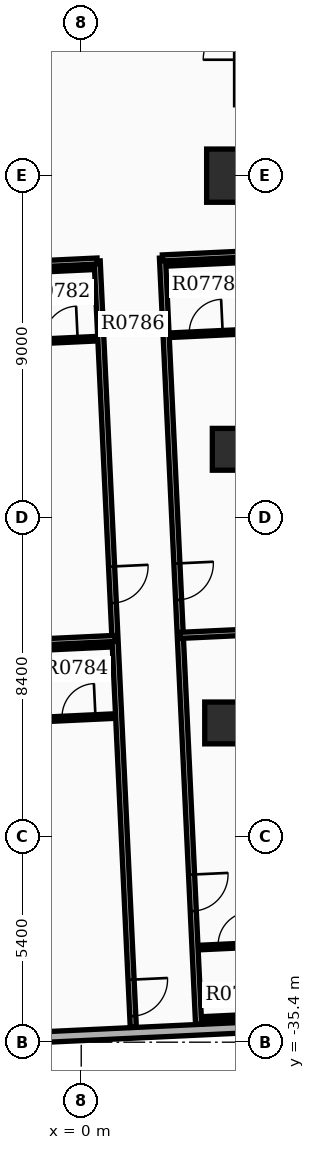
"""IFC4 building model, lengths in metres.
Left out: names, types, materials, properties, quantities, classifications, styles, units other than length and angle.
Written with IfcOpenShell. Run it as: python <this file> out.ifc"""

import sys

from ifc_helpers import new_model, si_unit, direction, frame, frame_2d, origin, origin_2d, place, context, subcontext, project, spatial, rectangle, extrude, element, fill, save


model = new_model("IFC4")
c1 = context("Model", 3, precision=1e-05, world=origin(), true_north=direction((0.0, 1.0)))
c2 = subcontext(c1, "Body", "Model", "MODEL_VIEW")
j1 = project(units=[si_unit("LENGTHUNIT", "METRE"), si_unit("PLANEANGLEUNIT", "RADIAN")], contexts=[c1])
p1 = place(None, origin())
s1 = spatial("IfcSite", under=j1, at=p1, CompositionType="ELEMENT")
p2 = place(p1, origin())
s2 = spatial("IfcBuilding", under=s1, at=p2, CompositionType="ELEMENT")
p3 = place(p2, frame((0.0, 0.0, 52.2)))
s3 = spatial("IfcBuildingStorey", under=s2, at=p3, CompositionType="ELEMENT", Elevation=52.2)
p4 = place(p3, frame((4.0, -12.6, 0.0), z_axis=(0.0, 0.0, 1.0), x_axis=(1.0, 0.0, 0.0)))
e1 = element("IfcColumn", 1, at=p4, inside=s3, PredefinedType="COLUMN", context=c2, shape_type="SweptSolid", body=[
    extrude(rectangle(XDim=1.4, YDim=1.4, at=origin_2d()), origin(), (0.0, 0.0, 1.0), 3.9),
])
for number, where, z_axis, x_axis in (
    (2, (4.0, -19.8, 0.0), (0.0, 0.0, 1.0), (1.0, 0.0, 0.0)),
    (3, (3.8, -27.0, 0.0), (0.0, 0.0, 1.0), (1.0, 0.0, 0.0)),
):
    element("IfcColumn", number, at=place(p3, frame(where, z_axis=z_axis, x_axis=x_axis)), inside=s3, PredefinedType="COLUMN", context=c2, shape_type="SweptSolid", body=[
        extrude(rectangle(XDim=1.1, YDim=1.1, at=origin_2d()), origin(), (0.0, 0.0, 1.0), 3.9),
    ])
p5 = place(p3, frame((-5.195, -35.464, 0.0), z_axis=(0.0, 0.0, 1.0), x_axis=(0.998890092147, 0.047101845086, 0.0)))
e4 = element("IfcWall", 4, at=p5, inside=s3, PredefinedType="STANDARD", context=c2, shape_type="SweptSolid", body=[
    extrude(rectangle(XDim=13.72, YDim=0.28, at=frame_2d((6.86, 0.0))), origin(), (0.0, 0.0, 1.0), 2.91),
])
p6 = place(p5, frame((0.85, 0.0, 0.85)))
e5 = element("IfcOpeningElement", 5, at=p6, cuts=e4, PredefinedType="OPENING", context=c2, shape_type="SweptSolid", body=[
    extrude(rectangle(XDim=1.0, YDim=1.5, at=frame_2d((0.5, 0.75))), frame((0.0, 0.15, 0.0), z_axis=(0.0, -1.0, 0.0), x_axis=(1.0, 0.0, 0.0)), (0.0, 0.0, 1.0), 0.3),
])
p7 = place(p3, frame((2.138, -14.766, 0.0), z_axis=(0.0, 0.0, 1.0), x_axis=(0.047105352469, -0.998889926753, 0.0)))
e6 = element("IfcWall", 6, at=p7, inside=s3, PredefinedType="PARTITIONING", context=c2, shape_type="SweptSolid", body=[
    extrude(rectangle(XDim=20.182, YDim=0.16, at=frame_2d((10.091, 0.0))), origin(), (0.0, 0.0, 1.0), 2.9),
])
p8 = place(p7, frame((8.047, 0.0, 0.0)))
e7 = element("IfcOpeningElement", 7, at=p8, cuts=e6, PredefinedType="OPENING", context=c2, shape_type="SweptSolid", body=[
    extrude(rectangle(XDim=0.96, YDim=2.15, at=frame_2d((0.48, 1.075))), frame((0.0, 0.09, 0.0), z_axis=(0.0, -1.0, 0.0), x_axis=(1.0, 0.0, 0.0)), (0.0, 0.0, 1.0), 0.18),
])
p9 = place(p7, frame((16.243, 0.0, 0.0)))
e8 = element("IfcOpeningElement", 8, at=p9, cuts=e6, PredefinedType="OPENING", context=c2, shape_type="SweptSolid", body=[
    extrude(rectangle(XDim=0.96, YDim=2.15, at=frame_2d((0.48, 1.075))), frame((0.0, 0.09, 0.0), z_axis=(0.0, -1.0, 0.0), x_axis=(1.0, 0.0, 0.0)), (0.0, 0.0, 1.0), 0.18),
])
p10 = place(p3, frame((2.138, -14.766, 0.0), z_axis=(0.0, 0.0, 1.0), x_axis=(0.998891553151, 0.047070851322, 0.0)))
e9 = element("IfcWall", 9, at=p10, inside=s3, PredefinedType="PARTITIONING", context=c2, shape_type="SweptSolid", body=[
    extrude(rectangle(XDim=5.28, YDim=0.16, at=frame_2d((2.64, 0.0))), origin(), (0.0, 0.0, 1.0), 2.9),
])
p11 = place(p3, frame((2.606, -24.696, 0.0), z_axis=(0.0, 0.0, 1.0), x_axis=(0.998890307811, 0.047097271264, 0.0)))
e10 = element("IfcWall", 10, at=p11, inside=s3, PredefinedType="PARTITIONING", context=c2, shape_type="SweptSolid", body=[
    extrude(rectangle(XDim=5.132, YDim=0.16, at=frame_2d((2.566, 0.0))), origin(), (0.0, 0.0, 1.0), 2.9),
])
p12 = place(p3, frame((2.374, -16.797, 0.0), z_axis=(0.0, 0.0, 1.0), x_axis=(0.998891083954, 0.047080807099, 0.0)))
e11 = element("IfcWall", 11, at=p12, inside=s3, PredefinedType="PARTITIONING", context=c2, shape_type="SweptSolid", body=[
    extrude(rectangle(XDim=1.82, YDim=0.12, at=frame_2d((0.91, 0.0))), origin(), (0.0, 0.0, 1.0), 2.9),
])
p13 = place(p12, frame((0.47, 0.0, 0.0)))
e12 = element("IfcOpeningElement", 12, at=p13, cuts=e11, PredefinedType="OPENING", context=c2, shape_type="SweptSolid", body=[
    extrude(rectangle(XDim=0.88, YDim=2.1, at=frame_2d((0.44, 1.05))), frame((0.0, 0.07, 0.0), z_axis=(0.0, -1.0, 0.0), x_axis=(1.0, 0.0, 0.0)), (0.0, 0.0, 1.0), 0.14),
])
p14 = place(p3, frame((2.285, -14.919, 0.0), z_axis=(0.0, 0.0, 1.0), x_axis=(0.998890786574, 0.047087116047, 0.0)))
e13 = element("IfcWall", 13, at=p14, inside=s3, PredefinedType="PARTITIONING", context=c2, shape_type="SweptSolid", body=[
    extrude(rectangle(XDim=1.82, YDim=0.12, at=frame_2d((0.91, 0.0))), origin(), (0.0, 0.0, 1.0), 2.9),
])
p15 = place(p3, frame((3.134, -32.909, 0.0), z_axis=(0.0, 0.0, 1.0), x_axis=(0.998890786574, 0.047087116047, 0.0)))
e14 = element("IfcWall", 14, at=p15, inside=s3, PredefinedType="PARTITIONING", context=c2, shape_type="SweptSolid", body=[
    extrude(rectangle(XDim=1.82, YDim=0.12, at=frame_2d((0.91, 0.0))), origin(), (0.0, 0.0, 1.0), 2.9),
])
p16 = place(p15, frame((0.47, 0.0, 0.0)))
e15 = element("IfcOpeningElement", 15, at=p16, cuts=e14, PredefinedType="OPENING", context=c2, shape_type="SweptSolid", body=[
    extrude(rectangle(XDim=0.88, YDim=2.1, at=frame_2d((0.44, 1.05))), frame((0.0, 0.07, 0.0), z_axis=(0.0, -1.0, 0.0), x_axis=(1.0, 0.0, 0.0)), (0.0, 0.0, 1.0), 0.14),
])
p17 = place(p3, frame((3.222, -34.787, 0.0), z_axis=(0.0, 0.0, 1.0), x_axis=(0.998890786574, 0.047087116047, 0.0)))
e16 = element("IfcWall", 16, at=p17, inside=s3, PredefinedType="PARTITIONING", context=c2, shape_type="SweptSolid", body=[
    extrude(rectangle(XDim=1.82, YDim=0.12, at=frame_2d((0.91, 0.0))), origin(), (0.0, 0.0, 1.0), 2.9),
])
p18 = place(p3, frame((0.42, -14.847, 0.0), z_axis=(0.0, 0.0, 1.0), x_axis=(0.047105352469, -0.998889926753, 0.0)))
e17 = element("IfcWall", 17, at=p18, inside=s3, PredefinedType="PARTITIONING", context=c2, shape_type="SweptSolid", body=[
    extrude(rectangle(XDim=20.182, YDim=0.16, at=frame_2d((10.091, 0.0))), origin(), (0.0, 0.0, 1.0), 2.9),
])
p19 = place(p18, frame((8.047, 0.0, 0.0)))
e18 = element("IfcOpeningElement", 18, at=p19, cuts=e17, PredefinedType="OPENING", context=c2, shape_type="SweptSolid", body=[
    extrude(rectangle(XDim=0.96, YDim=2.15, at=frame_2d((0.48, 1.075))), frame((0.0, 0.09, 0.0), z_axis=(0.0, -1.0, 0.0), x_axis=(1.0, 0.0, 0.0)), (0.0, 0.0, 1.0), 0.18),
])
p20 = place(p18, frame((18.93, 0.0, 0.0)))
e19 = element("IfcOpeningElement", 19, at=p20, cuts=e17, PredefinedType="OPENING", context=c2, shape_type="SweptSolid", body=[
    extrude(rectangle(XDim=0.96, YDim=2.15, at=frame_2d((0.48, 1.075))), frame((0.0, 0.09, 0.0), z_axis=(0.0, -1.0, 0.0), x_axis=(1.0, 0.0, 0.0)), (0.0, 0.0, 1.0), 0.18),
])
p21 = place(p3, frame((0.42, -14.847, 0.0), z_axis=(0.0, 0.0, 1.0), x_axis=(-0.998889138652, -0.047122061533, 0.0)))
e20 = element("IfcWall", 20, at=p21, inside=s3, PredefinedType="PARTITIONING", context=c2, shape_type="SweptSolid", body=[
    extrude(rectangle(XDim=6.44, YDim=0.16, at=frame_2d((3.22, 0.0))), origin(), (0.0, 0.0, 1.0), 2.9),
])
p22 = place(p3, frame((0.888, -24.777, 0.0), z_axis=(0.0, 0.0, 1.0), x_axis=(-0.998889977605, -0.047104274115, 0.0)))
e21 = element("IfcWall", 21, at=p22, inside=s3, PredefinedType="PARTITIONING", context=c2, shape_type="SweptSolid", body=[
    extrude(rectangle(XDim=6.292, YDim=0.16, at=frame_2d((3.146, 0.0))), origin(), (0.0, 0.0, 1.0), 2.9),
])
p23 = place(p3, frame((-1.442, -16.977, 0.0), z_axis=(0.0, 0.0, 1.0), x_axis=(0.998891083954, 0.047080807099, 0.0)))
e22 = element("IfcWall", 22, at=p23, inside=s3, PredefinedType="PARTITIONING", context=c2, shape_type="SweptSolid", body=[
    extrude(rectangle(XDim=1.82, YDim=0.12, at=frame_2d((0.91, 0.0))), origin(), (0.0, 0.0, 1.0), 2.9),
])
p24 = place(p23, frame((0.47, 0.0, 0.0)))
e23 = element("IfcOpeningElement", 23, at=p24, cuts=e22, PredefinedType="OPENING", context=c2, shape_type="SweptSolid", body=[
    extrude(rectangle(XDim=0.88, YDim=2.1, at=frame_2d((0.44, 1.05))), frame((0.0, 0.07, 0.0), z_axis=(0.0, -1.0, 0.0), x_axis=(1.0, 0.0, 0.0)), (0.0, 0.0, 1.0), 0.14),
])
p25 = place(p3, frame((-1.531, -15.099, 0.0), z_axis=(0.0, 0.0, 1.0), x_axis=(0.998891083954, 0.047080807099, 0.0)))
e24 = element("IfcWall", 24, at=p25, inside=s3, PredefinedType="PARTITIONING", context=c2, shape_type="SweptSolid", body=[
    extrude(rectangle(XDim=1.82, YDim=0.12, at=frame_2d((0.91, 0.0))), origin(), (0.0, 0.0, 1.0), 2.9),
])
p26 = place(p3, frame((-0.974, -26.907, 0.0), z_axis=(0.0, 0.0, 1.0), x_axis=(0.998891083954, 0.047080807099, 0.0)))
e25 = element("IfcWall", 25, at=p26, inside=s3, PredefinedType="PARTITIONING", context=c2, shape_type="SweptSolid", body=[
    extrude(rectangle(XDim=1.82, YDim=0.12, at=frame_2d((0.91, 0.0))), origin(), (0.0, 0.0, 1.0), 2.9),
])
p27 = place(p26, frame((0.47, 0.0, 0.0)))
e26 = element("IfcOpeningElement", 26, at=p27, cuts=e25, PredefinedType="OPENING", context=c2, shape_type="SweptSolid", body=[
    extrude(rectangle(XDim=0.88, YDim=2.1, at=frame_2d((0.44, 1.05))), frame((0.0, 0.07, 0.0), z_axis=(0.0, -1.0, 0.0), x_axis=(1.0, 0.0, 0.0)), (0.0, 0.0, 1.0), 0.14),
])
p28 = place(p3, frame((-1.062, -25.029, 0.0), z_axis=(0.0, 0.0, 1.0), x_axis=(0.998891083954, 0.047080807099, 0.0)))
e27 = element("IfcWall", 27, at=p28, inside=s3, PredefinedType="PARTITIONING", context=c2, shape_type="SweptSolid", body=[
    extrude(rectangle(XDim=1.82, YDim=0.12, at=frame_2d((0.91, 0.0))), origin(), (0.0, 0.0, 1.0), 2.9),
])
p29 = place(p8, origin())
e28 = element("IfcDoor", 28, at=p29, inside=s3, OperationType="SINGLE_SWING_LEFT", PredefinedType="DOOR", context=c2, shape_type="SweptSolid", body=[
    extrude(rectangle(XDim=0.96, YDim=2.15, at=frame_2d((0.48, 1.075))), frame((0.0, 0.025, 0.0), z_axis=(0.0, -1.0, 0.0), x_axis=(1.0, 0.0, 0.0)), (0.0, 0.0, 1.0), 0.05),
])
fill(e7, e28)
p30 = place(p13, origin())
e29 = element("IfcDoor", 29, at=p30, inside=s3, OperationType="SINGLE_SWING_RIGHT", PredefinedType="DOOR", context=c2, shape_type="SweptSolid", body=[
    extrude(rectangle(XDim=0.88, YDim=2.1, at=frame_2d((0.44, 1.05))), frame((0.0, 0.025, 0.0), z_axis=(0.0, -1.0, 0.0), x_axis=(1.0, 0.0, 0.0)), (0.0, 0.0, 1.0), 0.05),
])
fill(e12, e29)
p31 = place(p9, origin())
e30 = element("IfcDoor", 30, at=p31, inside=s3, OperationType="SINGLE_SWING_LEFT", PredefinedType="DOOR", context=c2, shape_type="SweptSolid", body=[
    extrude(rectangle(XDim=0.96, YDim=2.15, at=frame_2d((0.48, 1.075))), frame((0.0, 0.025, 0.0), z_axis=(0.0, -1.0, 0.0), x_axis=(1.0, 0.0, 0.0)), (0.0, 0.0, 1.0), 0.05),
])
fill(e8, e30)
p32 = place(p16, origin())
e31 = element("IfcDoor", 31, at=p32, inside=s3, OperationType="SINGLE_SWING_RIGHT", PredefinedType="DOOR", context=c2, shape_type="SweptSolid", body=[
    extrude(rectangle(XDim=0.88, YDim=2.1, at=frame_2d((0.44, 1.05))), frame((0.0, 0.025, 0.0), z_axis=(0.0, -1.0, 0.0), x_axis=(1.0, 0.0, 0.0)), (0.0, 0.0, 1.0), 0.05),
])
fill(e15, e31)
p33 = place(p19, origin())
e32 = element("IfcDoor", 32, at=p33, inside=s3, OperationType="SINGLE_SWING_LEFT", PredefinedType="DOOR", context=c2, shape_type="SweptSolid", body=[
    extrude(rectangle(XDim=0.96, YDim=2.15, at=frame_2d((0.48, 1.075))), frame((0.0, 0.025, 0.0), z_axis=(0.0, -1.0, 0.0), x_axis=(1.0, 0.0, 0.0)), (0.0, 0.0, 1.0), 0.05),
])
fill(e18, e32)
p34 = place(p24, origin())
e33 = element("IfcDoor", 33, at=p34, inside=s3, OperationType="SINGLE_SWING_RIGHT", PredefinedType="DOOR", context=c2, shape_type="SweptSolid", body=[
    extrude(rectangle(XDim=0.88, YDim=2.1, at=frame_2d((0.44, 1.05))), frame((0.0, 0.025, 0.0), z_axis=(0.0, -1.0, 0.0), x_axis=(1.0, 0.0, 0.0)), (0.0, 0.0, 1.0), 0.05),
])
fill(e23, e33)
p35 = place(p20, origin())
e34 = element("IfcDoor", 34, at=p35, inside=s3, OperationType="SINGLE_SWING_LEFT", PredefinedType="DOOR", context=c2, shape_type="SweptSolid", body=[
    extrude(rectangle(XDim=0.96, YDim=2.15, at=frame_2d((0.48, 1.075))), frame((0.0, 0.025, 0.0), z_axis=(0.0, -1.0, 0.0), x_axis=(1.0, 0.0, 0.0)), (0.0, 0.0, 1.0), 0.05),
])
fill(e19, e34)
p36 = place(p27, origin())
e35 = element("IfcDoor", 35, at=p36, inside=s3, OperationType="SINGLE_SWING_RIGHT", PredefinedType="DOOR", context=c2, shape_type="SweptSolid", body=[
    extrude(rectangle(XDim=0.88, YDim=2.1, at=frame_2d((0.44, 1.05))), frame((0.0, 0.025, 0.0), z_axis=(0.0, -1.0, 0.0), x_axis=(1.0, 0.0, 0.0)), (0.0, 0.0, 1.0), 0.05),
])
fill(e26, e35)
save(model, sys.argv[1])
